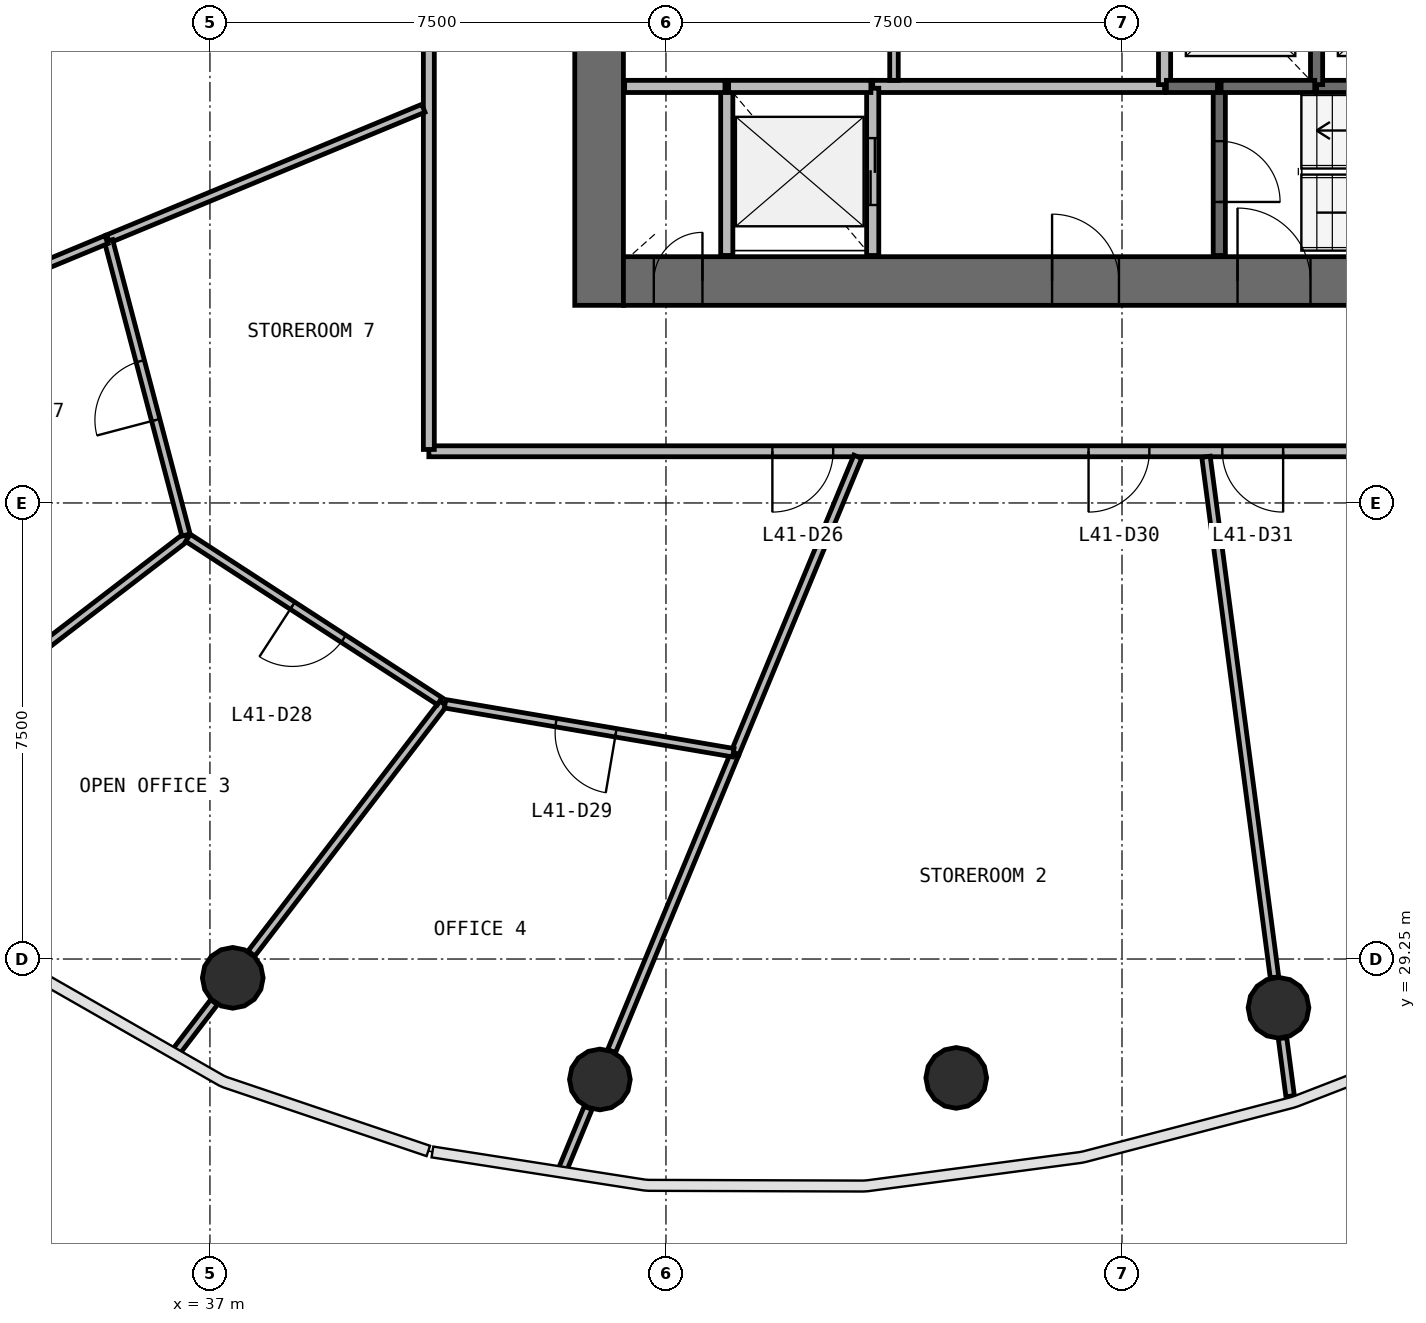
"""IFC4 building model, lengths in metres.
Left out: names, types, materials, properties, quantities, classifications, styles, units other than length and angle.
Written with IfcOpenShell. Run it as: python <this file> out.ifc"""

import sys

from ifc_helpers import new_model, si_unit, direction, frame, frame_2d, origin, origin_2d, place, context, subcontext, project, spatial, rectangle, circle, extrude, source, transform, mapped, element, fill, save


model = new_model("IFC4")
c1 = context("Model", 3, precision=1e-05, world=origin(), true_north=direction((0.0, 1.0)))
c2 = subcontext(c1, "Body", "Model", "MODEL_VIEW")
j1 = project(units=[si_unit("LENGTHUNIT", "METRE"), si_unit("PLANEANGLEUNIT", "RADIAN")], contexts=[c1])
p1 = place(None, origin())
s1 = spatial("IfcSite", under=j1, at=p1, CompositionType="ELEMENT")
p2 = place(p1, origin())
s2 = spatial("IfcBuilding", under=s1, at=p2, CompositionType="ELEMENT")
p3 = place(p2, frame((0.0, 0.0, 172.1)))
s3 = spatial("IfcBuildingStorey", under=s2, at=p3, CompositionType="ELEMENT", Elevation=172.1)
p4 = place(p3, frame((43.4, 56.0, 0.0), z_axis=(0.0, 0.0, 1.0), x_axis=(0.0, -1.0, 0.0)))
e1 = element("IfcWall", 1, at=p4, inside=s3, PredefinedType="SHEAR", context=c2, shape_type="SweptSolid", body=[
    extrude(rectangle(XDim=16.0, YDim=0.8, at=frame_2d((8.0, 0.0))), origin(), (0.0, 0.0, 1.0), 3.9),
])
p5 = place(p4, frame((7.1, 0.0, 0.0)))
e2 = element("IfcOpeningElement", 2, at=p5, cuts=e1, PredefinedType="OPENING", context=c2, shape_type="SweptSolid", body=[
    extrude(rectangle(XDim=1.8, YDim=2.1, at=frame_2d((0.9, 1.05))), frame((0.0, 0.41, 0.0), z_axis=(0.0, -1.0, 0.0), x_axis=(1.0, 0.0, 0.0)), (0.0, 0.0, 1.0), 0.82),
])
p6 = place(p3, frame((43.8, 40.4, 0.0), z_axis=(0.0, 0.0, 1.0), x_axis=(1.0, 0.0, 0.0)))
e3 = element("IfcWall", 3, at=p6, inside=s3, PredefinedType="SHEAR", context=c2, shape_type="SweptSolid", body=[
    extrude(rectangle(XDim=16.4, YDim=0.8, at=frame_2d((8.2, 0.0))), origin(), (0.0, 0.0, 1.0), 3.9),
])
p7 = place(p6, frame((10.1, 0.0, 0.0)))
e4 = element("IfcOpeningElement", 4, at=p7, cuts=e3, PredefinedType="OPENING", context=c2, shape_type="SweptSolid", body=[
    extrude(rectangle(XDim=1.2, YDim=2.1, at=frame_2d((0.6, 1.05))), frame((0.0, 0.41, 0.0), z_axis=(0.0, -1.0, 0.0), x_axis=(1.0, 0.0, 0.0)), (0.0, 0.0, 1.0), 0.82),
])
p8 = place(p6, frame((7.05, 0.0, 0.0)))
e5 = element("IfcOpeningElement", 5, at=p8, cuts=e3, PredefinedType="OPENING", context=c2, shape_type="SweptSolid", body=[
    extrude(rectangle(XDim=1.1, YDim=2.1, at=frame_2d((0.55, 1.05))), frame((0.0, 0.41, 0.0), z_axis=(0.0, -1.0, 0.0), x_axis=(1.0, 0.0, 0.0)), (0.0, 0.0, 1.0), 0.82),
])
p9 = place(p6, frame((0.5, 0.0, 0.0)))
e6 = element("IfcOpeningElement", 6, at=p9, cuts=e3, PredefinedType="OPENING", context=c2, shape_type="SweptSolid", body=[
    extrude(rectangle(XDim=0.8, YDim=2.1, at=frame_2d((0.4, 1.05))), frame((0.0, 0.41, 0.0), z_axis=(0.0, -1.0, 0.0), x_axis=(1.0, 0.0, 0.0)), (0.0, 0.0, 1.0), 0.82),
])
m1 = source(origin(), c2, "Body", "SweptSolid", [
    extrude(circle(Radius=0.5, at=origin_2d()), origin(), (0.0, 0.0, 1.0), 3.9),
])
for number, where, z_axis, x_axis in (
    (7, (37.375, 28.94, 0.0), (0.0, 0.0, 1.0), (1.0, 0.0, 0.0)),
    (8, (43.413, 27.269, 0.0), (0.0, 0.0, 1.0), (1.0, 0.0, 0.0)),
    (9, (49.274, 27.295, 0.0), (0.0, 0.0, 1.0), (1.0, 0.0, 0.0)),
    (10, (54.574, 28.449, 0.0), (0.0, 0.0, 1.0), (1.0, 0.0, 0.0)),
):
    element("IfcColumn", number, at=place(p3, frame(where, z_axis=z_axis, x_axis=x_axis)), inside=s3, PredefinedType="COLUMN", context=c2, shape_type="MappedRepresentation", body=[
        mapped(m1, transform((0.0, 0.0, 0.0), scale=1.0)),
    ])
p10 = place(p3, frame((52.7, 43.6, 0.0), z_axis=(0.0, 0.0, 1.0), x_axis=(-1.0, 0.0, 0.0)))
e11 = element("IfcWall", 11, at=p10, inside=s3, PredefinedType="SOLIDWALL", context=c2, shape_type="SweptSolid", body=[
    extrude(rectangle(XDim=4.8, YDim=0.2, at=frame_2d((2.4, 0.0))), origin(), (0.0, 0.0, 1.0), 3.58),
])
p11 = place(p3, frame((45.5, 43.6, 0.0), z_axis=(0.0, 0.0, 1.0), x_axis=(0.0, -1.0, 0.0)))
e12 = element("IfcWall", 12, at=p11, inside=s3, PredefinedType="SOLIDWALL", context=c2, shape_type="SweptSolid", body=[
    extrude(rectangle(XDim=2.78, YDim=0.2, at=frame_2d((1.39, 0.0))), origin(), (0.0, 0.0, 1.0), 3.58),
])
p12 = place(p3, frame((47.9, 40.82, 0.0), z_axis=(0.0, 0.0, 1.0), x_axis=(0.0, 1.0, 0.0)))
e13 = element("IfcWall", 13, at=p12, inside=s3, PredefinedType="SOLIDWALL", context=c2, shape_type="SweptSolid", body=[
    extrude(rectangle(XDim=2.75, YDim=0.2, at=frame_2d((1.375, 0.0))), origin(), (0.0, 0.0, 1.0), 3.58),
])
p13 = place(p12, frame((0.83, 0.0, 0.0)))
e14 = element("IfcOpeningElement", 14, at=p13, cuts=e13, PredefinedType="OPENING", context=c2, shape_type="SweptSolid", body=[
    extrude(rectangle(XDim=1.1, YDim=2.1, at=frame_2d((0.55, 1.05))), frame((0.0, 0.11, 0.0), z_axis=(0.0, -1.0, 0.0), x_axis=(1.0, 0.0, 0.0)), (0.0, 0.0, 1.0), 0.22),
])
p14 = place(p3, frame((53.6, 43.6, 0.0), z_axis=(0.0, 0.0, 1.0), x_axis=(0.0, -1.0, 0.0)))
e15 = element("IfcWall", 15, at=p14, inside=s3, PredefinedType="SOLIDWALL", context=c2, shape_type="SweptSolid", body=[
    extrude(rectangle(XDim=2.78, YDim=0.2, at=frame_2d((1.39, 0.0))), origin(), (0.0, 0.0, 1.0), 3.58),
])
p15 = place(p14, frame((0.9, 0.0, 0.0)))
e16 = element("IfcOpeningElement", 16, at=p15, cuts=e15, PredefinedType="OPENING", context=c2, shape_type="SweptSolid", body=[
    extrude(rectangle(XDim=1.0, YDim=2.1, at=frame_2d((0.5, 1.05))), frame((0.0, 0.11, 0.0), z_axis=(0.0, -1.0, 0.0), x_axis=(1.0, 0.0, 0.0)), (0.0, 0.0, 1.0), 0.22),
])
p16 = place(p3, frame((55.2, 43.6, 0.0), z_axis=(0.0, 0.0, 1.0), x_axis=(1.0, 0.0, 0.0)))
e17 = element("IfcWall", 17, at=p16, inside=s3, PredefinedType="SOLIDWALL", context=c2, shape_type="SweptSolid", body=[
    extrude(rectangle(XDim=2.5, YDim=0.2, at=frame_2d((1.25, 0.0))), origin(), (0.0, 0.0, 1.0), 3.58),
])
p17 = place(p3, frame((47.87, 43.6, 0.0), z_axis=(0.0, 0.0, 1.0), x_axis=(-1.0, 0.0, 0.0)))
e18 = element("IfcWall", 18, at=p17, inside=s3, PredefinedType="SOLIDWALL", context=c2, shape_type="SweptSolid", body=[
    extrude(rectangle(XDim=2.34, YDim=0.2, at=frame_2d((1.17, 0.0))), origin(), (0.0, 0.0, 1.0), 3.58),
])
for number, where, z_axis, x_axis in (
    (19, (52.7, 45.99, 0.0), (0.0, 0.0, 1.0), (0.0, -1.0, 0.0)),
    (20, (55.2, 43.63, 0.0), (0.0, 0.0, 1.0), (0.0, 1.0, 0.0)),
):
    element("IfcWall", number, at=place(p3, frame(where, z_axis=z_axis, x_axis=x_axis)), inside=s3, PredefinedType="SOLIDWALL", context=c2, shape_type="SweptSolid", body=[
        extrude(rectangle(XDim=2.36, YDim=0.2, at=frame_2d((1.18, 0.0))), origin(), (0.0, 0.0, 1.0), 3.58),
    ])
p18 = place(p3, frame((45.47, 43.6, 0.0), z_axis=(0.0, 0.0, 1.0), x_axis=(-1.0, 0.0, 0.0)))
e21 = element("IfcWall", 21, at=p18, inside=s3, PredefinedType="SOLIDWALL", context=c2, shape_type="SweptSolid", body=[
    extrude(rectangle(XDim=1.65, YDim=0.2, at=frame_2d((0.825, 0.0))), origin(), (0.0, 0.0, 1.0), 3.58),
])
p19 = place(p3, frame((53.63, 43.6, 0.0), z_axis=(0.0, 0.0, 1.0), x_axis=(1.0, 0.0, 0.0)))
e22 = element("IfcWall", 22, at=p19, inside=s3, PredefinedType="SOLIDWALL", context=c2, shape_type="SweptSolid", body=[
    extrude(rectangle(XDim=1.54, YDim=0.2, at=frame_2d((0.77, 0.0))), origin(), (0.0, 0.0, 1.0), 3.58),
])
p20 = place(p3, frame((52.73, 43.6, 0.0), z_axis=(0.0, 0.0, 1.0), x_axis=(1.0, 0.0, 0.0)))
e23 = element("IfcWall", 23, at=p20, inside=s3, PredefinedType="SOLIDWALL", context=c2, shape_type="SweptSolid", body=[
    extrude(rectangle(XDim=0.84, YDim=0.2, at=frame_2d((0.42, 0.0))), origin(), (0.0, 0.0, 1.0), 3.58),
])
p21 = place(p3, frame((63.4, 37.6, 0.0), z_axis=(0.0, 0.0, 1.0), x_axis=(-1.0, 0.0, 0.0)))
e24 = element("IfcWall", 24, at=p21, inside=s3, PredefinedType="PARTITIONING", context=c2, shape_type="SweptSolid", body=[
    extrude(rectangle(XDim=22.8, YDim=0.18, at=frame_2d((11.4, 0.0))), origin(), (0.0, 0.0, 1.0), 2.88),
])
p22 = place(p21, frame((16.15, 0.0, 0.0)))
e25 = element("IfcOpeningElement", 25, at=p22, cuts=e24, PredefinedType="OPENING", context=c2, shape_type="SweptSolid", body=[
    extrude(rectangle(XDim=1.0, YDim=2.1, at=frame_2d((0.5, 1.05))), frame((0.0, 0.1, 0.0), z_axis=(0.0, -1.0, 0.0), x_axis=(1.0, 0.0, 0.0)), (0.0, 0.0, 1.0), 0.2),
])
p23 = place(p21, frame((10.95, 0.0, 0.0)))
e26 = element("IfcOpeningElement", 26, at=p23, cuts=e24, PredefinedType="OPENING", context=c2, shape_type="SweptSolid", body=[
    extrude(rectangle(XDim=1.0, YDim=2.1, at=frame_2d((0.5, 1.05))), frame((0.0, 0.1, 0.0), z_axis=(0.0, -1.0, 0.0), x_axis=(1.0, 0.0, 0.0)), (0.0, 0.0, 1.0), 0.2),
])
p24 = place(p21, frame((8.75, 0.0, 0.0)))
e27 = element("IfcOpeningElement", 27, at=p24, cuts=e24, PredefinedType="OPENING", context=c2, shape_type="SweptSolid", body=[
    extrude(rectangle(XDim=1.0, YDim=2.1, at=frame_2d((0.5, 1.05))), frame((0.0, 0.1, 0.0), z_axis=(0.0, -1.0, 0.0), x_axis=(1.0, 0.0, 0.0)), (0.0, 0.0, 1.0), 0.2),
])
p25 = place(p3, frame((40.6, 37.63, 0.0), z_axis=(0.0, 0.0, 1.0), x_axis=(0.0, 1.0, 0.0)))
e28 = element("IfcWall", 28, at=p25, inside=s3, PredefinedType="PARTITIONING", context=c2, shape_type="SweptSolid", body=[
    extrude(rectangle(XDim=20.74, YDim=0.18, at=frame_2d((10.37, 0.0))), origin(), (0.0, 0.0, 1.0), 2.88),
])
p26 = place(p25, frame((15.39, 0.0, 0.0)))
e29 = element("IfcOpeningElement", 29, at=p26, cuts=e28, PredefinedType="OPENING", context=c2, shape_type="SweptSolid", body=[
    extrude(rectangle(XDim=0.9, YDim=2.1, at=frame_2d((0.45, 1.05))), frame((0.0, 0.1, 0.0), z_axis=(0.0, -1.0, 0.0), x_axis=(1.0, 0.0, 0.0)), (0.0, 0.0, 1.0), 0.2),
])
p27 = place(p25, frame((9.89, 0.0, 0.0)))
e30 = element("IfcOpeningElement", 30, at=p27, cuts=e28, PredefinedType="OPENING", context=c2, shape_type="SweptSolid", body=[
    extrude(rectangle(XDim=1.0, YDim=2.1, at=frame_2d((0.5, 1.05))), frame((0.0, 0.1, 0.0), z_axis=(0.0, -1.0, 0.0), x_axis=(1.0, 0.0, 0.0)), (0.0, 0.0, 1.0), 0.2),
])
p28 = place(p3, frame((53.381, 37.51, 0.0), z_axis=(0.0, 0.0, 1.0), x_axis=(0.130507901859, -0.991447269174, 0.0)))
e31 = element("IfcWall", 31, at=p28, inside=s3, PredefinedType="PARTITIONING", context=c2, shape_type="SweptSolid", body=[
    extrude(rectangle(XDim=8.635, YDim=0.14, at=frame_2d((4.318, 0.0))), origin(), (0.0, 0.0, 1.0), 2.88),
])
p29 = place(p3, frame((40.51, 43.241, 0.0), z_axis=(0.0, 0.0, 1.0), x_axis=(-0.923868925848, -0.382709038112, 0.0)))
e32 = element("IfcWall", 32, at=p29, inside=s3, PredefinedType="PARTITIONING", context=c2, shape_type="SweptSolid", body=[
    extrude(rectangle(XDim=5.613, YDim=0.14, at=frame_2d((2.807, 0.0))), origin(), (0.0, 0.0, 1.0), 2.88),
])
p30 = place(p3, frame((47.655, 37.51, 0.0), z_axis=(0.0, 0.0, 1.0), x_axis=(-0.382658470946, -0.923889871474, 0.0)))
e33 = element("IfcWall", 33, at=p30, inside=s3, PredefinedType="PARTITIONING", context=c2, shape_type="SweptSolid", body=[
    extrude(rectangle(XDim=5.273, YDim=0.14, at=frame_2d((2.637, 0.0))), origin(), (0.0, 0.0, 1.0), 2.88),
])
p31 = place(p3, frame((45.625, 32.61, 0.0), z_axis=(0.0, 0.0, 1.0), x_axis=(-0.382699142992, -0.9238730248, 0.0)))
e34 = element("IfcWall", 34, at=p31, inside=s3, PredefinedType="PARTITIONING", context=c2, shape_type="SweptSolid", body=[
    extrude(rectangle(XDim=5.276, YDim=0.14, at=frame_2d((2.638, 0.0))), origin(), (0.0, 0.0, 1.0), 2.88),
])
p32 = place(p3, frame((40.837, 33.453, 0.0), z_axis=(0.0, 0.0, 1.0), x_axis=(-0.608781556018, -0.793337895888, 0.0)))
e35 = element("IfcWall", 35, at=p32, inside=s3, PredefinedType="PARTITIONING", context=c2, shape_type="SweptSolid", body=[
    extrude(rectangle(XDim=5.183, YDim=0.14, at=frame_2d((2.591, 0.0))), origin(), (0.0, 0.0, 1.0), 2.88),
])
p33 = place(p3, frame((36.614, 36.194, 0.0), z_axis=(0.0, 0.0, 1.0), x_axis=(-0.793380951851, -0.608725443234, 0.0)))
e36 = element("IfcWall", 36, at=p33, inside=s3, PredefinedType="PARTITIONING", context=c2, shape_type="SweptSolid", body=[
    extrude(rectangle(XDim=5.092, YDim=0.14, at=frame_2d((2.546, 0.0))), origin(), (0.0, 0.0, 1.0), 2.88),
])
p34 = place(p3, frame((36.606, 36.223, 0.0), z_axis=(0.0, 0.0, 1.0), x_axis=(-0.254531708775, 0.967064428685, 0.0)))
e37 = element("IfcWall", 37, at=p34, inside=s3, PredefinedType="PARTITIONING", context=c2, shape_type="SweptSolid", body=[
    extrude(rectangle(XDim=5.006, YDim=0.14, at=frame_2d((2.503, 0.0))), origin(), (0.0, 0.0, 1.0), 2.88),
])
p35 = place(p34, frame((1.956, 0.0, 0.0)))
e38 = element("IfcOpeningElement", 38, at=p35, cuts=e37, PredefinedType="OPENING", context=c2, shape_type="SweptSolid", body=[
    extrude(rectangle(XDim=1.0, YDim=2.1, at=frame_2d((0.5, 1.05))), frame((0.0, 0.08, 0.0), z_axis=(0.0, -1.0, 0.0), x_axis=(1.0, 0.0, 0.0)), (0.0, 0.0, 1.0), 0.16),
])
p36 = place(p3, frame((40.779, 33.491, 0.0), z_axis=(0.0, 0.0, 1.0), x_axis=(-0.83885932545, 0.544348263619, 0.0)))
e39 = element("IfcWall", 39, at=p36, inside=s3, PredefinedType="PARTITIONING", context=c2, shape_type="SweptSolid", body=[
    extrude(rectangle(XDim=4.935, YDim=0.14, at=frame_2d((2.467, 0.0))), origin(), (0.0, 0.0, 1.0), 2.88),
])
p37 = place(p36, frame((1.885, 0.0, 0.0)))
e40 = element("IfcOpeningElement", 40, at=p37, cuts=e39, PredefinedType="OPENING", context=c2, shape_type="SweptSolid", body=[
    extrude(rectangle(XDim=1.0, YDim=2.1, at=frame_2d((0.5, 1.05))), frame((0.0, 0.08, 0.0), z_axis=(0.0, -1.0, 0.0), x_axis=(1.0, 0.0, 0.0)), (0.0, 0.0, 1.0), 0.16),
])
p38 = place(p3, frame((45.607, 32.643, 0.0), z_axis=(0.0, 0.0, 1.0), x_axis=(-0.985896840753, 0.167354173514, 0.0)))
e41 = element("IfcWall", 41, at=p38, inside=s3, PredefinedType="PARTITIONING", context=c2, shape_type="SweptSolid", body=[
    extrude(rectangle(XDim=4.808, YDim=0.14, at=frame_2d((2.404, 0.0))), origin(), (0.0, 0.0, 1.0), 2.88),
])
p39 = place(p38, frame((1.958, 0.0, 0.0)))
e42 = element("IfcOpeningElement", 42, at=p39, cuts=e41, PredefinedType="OPENING", context=c2, shape_type="SweptSolid", body=[
    extrude(rectangle(XDim=1.0, YDim=2.1, at=frame_2d((0.5, 1.05))), frame((0.0, 0.08, 0.0), z_axis=(0.0, -1.0, 0.0), x_axis=(1.0, 0.0, 0.0)), (0.0, 0.0, 1.0), 0.16),
])
p40 = place(p3, frame((48.25, 43.7, 0.0), z_axis=(0.0, 0.0, 1.0), x_axis=(0.0, 1.0, 0.0)))
e43 = element("IfcWall", 43, at=p40, inside=s3, PredefinedType="PARTITIONING", context=c2, shape_type="SweptSolid", body=[
    extrude(rectangle(XDim=2.29, YDim=0.14, at=frame_2d((1.145, 0.0))), origin(), (0.0, 0.0, 1.0), 2.88),
])
p41 = place(p3, frame((35.296, 41.081, 0.0), z_axis=(0.0, 0.0, 1.0), x_axis=(-0.923914904854, -0.38259802481, 0.0)))
e44 = element("IfcWall", 44, at=p41, inside=s3, PredefinedType="PARTITIONING", context=c2, shape_type="SweptSolid", body=[
    extrude(rectangle(XDim=1.255, YDim=0.14, at=frame_2d((0.627, 0.0))), origin(), (0.0, 0.0, 1.0), 2.88),
])
p42 = place(p3, frame((43.22, 26.802, 0.0), z_axis=(0.0, 0.0, 1.0), x_axis=(-0.382724096228, -0.923862687939, 0.0)))
e45 = element("IfcWall", 45, at=p42, inside=s3, PredefinedType="PARTITIONING", context=c2, shape_type="SweptSolid", body=[
    extrude(rectangle(XDim=1.1, YDim=0.14, at=frame_2d((0.55, 0.0))), origin(), (0.0, 0.0, 1.0), 2.88),
])
p43 = place(p3, frame((37.068, 28.54, 0.0), z_axis=(0.0, 0.0, 1.0), x_axis=(-0.608710939512, -0.793392079692, 0.0)))
e46 = element("IfcWall", 46, at=p43, inside=s3, PredefinedType="PARTITIONING", context=c2, shape_type="SweptSolid", body=[
    extrude(rectangle(XDim=1.027, YDim=0.14, at=frame_2d((0.514, 0.0))), origin(), (0.0, 0.0, 1.0), 2.88),
])
p44 = place(p3, frame((54.64, 27.948, 0.0), z_axis=(0.0, 0.0, 1.0), x_axis=(0.130303682633, -0.991474129916, 0.0)))
e47 = element("IfcWall", 47, at=p44, inside=s3, PredefinedType="PARTITIONING", context=c2, shape_type="SweptSolid", body=[
    extrude(rectangle(XDim=0.963, YDim=0.14, at=frame_2d((0.481, 0.0))), origin(), (0.0, 0.0, 1.0), 2.88),
])
m2 = source(origin(), c2, "Body", "SweptSolid", [
    extrude(rectangle(XDim=1.1, YDim=2.1, at=frame_2d((0.55, 1.05))), frame((0.0, 0.025, 0.0), z_axis=(0.0, -1.0, 0.0), x_axis=(1.0, 0.0, 0.0)), (0.0, 0.0, 1.0), 0.05),
])
p45 = place(p13, origin())
e48 = element("IfcDoor", 48, at=p45, inside=s3, OperationType="DOUBLE_DOOR_SLIDING", PredefinedType="USERDEFINED", context=c2, shape_type="MappedRepresentation", body=[
    mapped(m2, transform((0.0, 0.0, 0.0), scale=1.0)),
])
fill(e14, e48)
m3 = source(origin(), c2, "Body", "SweptSolid", [
    extrude(rectangle(XDim=1.2, YDim=2.1, at=frame_2d((0.6, 1.05))), frame((0.0, 0.025, 0.0), z_axis=(0.0, -1.0, 0.0), x_axis=(1.0, 0.0, 0.0)), (0.0, 0.0, 1.0), 0.05),
])
p46 = place(p7, origin())
e49 = element("IfcDoor", 49, at=p46, inside=s3, OperationType="SINGLE_SWING_LEFT", PredefinedType="DOOR", context=c2, shape_type="MappedRepresentation", body=[
    mapped(m3, transform((0.0, 0.0, 0.0), scale=1.0)),
])
fill(e4, e49)
m4 = source(origin(), c2, "Body", "SweptSolid", [
    extrude(rectangle(XDim=1.0, YDim=2.1, at=frame_2d((0.5, 1.05))), frame((0.0, 0.025, 0.0), z_axis=(0.0, -1.0, 0.0), x_axis=(1.0, 0.0, 0.0)), (0.0, 0.0, 1.0), 0.05),
])
p47 = place(p15, origin())
e50 = element("IfcDoor", 50, at=p47, inside=s3, OperationType="SINGLE_SWING_RIGHT", PredefinedType="DOOR", context=c2, shape_type="MappedRepresentation", body=[
    mapped(m4, transform((0.0, 0.0, 0.0), scale=1.0)),
])
fill(e16, e50)
m5 = source(origin(), c2, "Body", "SweptSolid", [
    extrude(rectangle(XDim=1.1, YDim=2.1, at=frame_2d((0.55, 1.05))), frame((0.0, 0.025, 0.0), z_axis=(0.0, -1.0, 0.0), x_axis=(1.0, 0.0, 0.0)), (0.0, 0.0, 1.0), 0.05),
])
p48 = place(p8, origin())
e51 = element("IfcDoor", 51, at=p48, inside=s3, OperationType="SINGLE_SWING_LEFT", PredefinedType="DOOR", context=c2, shape_type="MappedRepresentation", body=[
    mapped(m5, transform((0.0, 0.0, 0.0), scale=1.0)),
])
fill(e5, e51)
m6 = source(origin(), c2, "Body", "SweptSolid", [
    extrude(rectangle(XDim=0.8, YDim=2.1, at=frame_2d((0.4, 1.05))), frame((0.0, 0.025, 0.0), z_axis=(0.0, -1.0, 0.0), x_axis=(1.0, 0.0, 0.0)), (0.0, 0.0, 1.0), 0.05),
])
p49 = place(p9, origin())
e52 = element("IfcDoor", 52, at=p49, inside=s3, OperationType="SINGLE_SWING_RIGHT", PredefinedType="DOOR", context=c2, shape_type="MappedRepresentation", body=[
    mapped(m6, transform((0.0, 0.0, 0.0), scale=1.0)),
])
fill(e6, e52)
m7 = source(origin(), c2, "Body", "SweptSolid", [
    extrude(rectangle(XDim=1.0, YDim=2.1, at=frame_2d((0.5, 1.05))), frame((0.0, 0.025, 0.0), z_axis=(0.0, -1.0, 0.0), x_axis=(1.0, 0.0, 0.0)), (0.0, 0.0, 1.0), 0.05),
])
p50 = place(p22, origin())
e53 = element("IfcDoor", 53, at=p50, inside=s3, OperationType="SINGLE_SWING_RIGHT", PredefinedType="DOOR", context=c2, shape_type="MappedRepresentation", body=[
    mapped(m7, transform((0.0, 0.0, 0.0), scale=1.0)),
])
fill(e25, e53)
p51 = place(p35, origin())
e54 = element("IfcDoor", 54, at=p51, inside=s3, OperationType="SINGLE_SWING_LEFT", PredefinedType="DOOR", context=c2, shape_type="MappedRepresentation", body=[
    mapped(m7, transform((0.0, 0.0, 0.0), scale=1.0)),
])
fill(e38, e54)
p52 = place(p37, origin())
e55 = element("IfcDoor", 55, at=p52, inside=s3, OperationType="SINGLE_SWING_RIGHT", PredefinedType="DOOR", context=c2, shape_type="MappedRepresentation", body=[
    mapped(m7, transform((0.0, 0.0, 0.0), scale=1.0)),
])
fill(e40, e55)
p53 = place(p39, origin())
e56 = element("IfcDoor", 56, at=p53, inside=s3, OperationType="SINGLE_SWING_LEFT", PredefinedType="DOOR", context=c2, shape_type="MappedRepresentation", body=[
    mapped(m7, transform((0.0, 0.0, 0.0), scale=1.0)),
])
fill(e42, e56)
p54 = place(p23, origin())
e57 = element("IfcDoor", 57, at=p54, inside=s3, OperationType="SINGLE_SWING_RIGHT", PredefinedType="DOOR", context=c2, shape_type="MappedRepresentation", body=[
    mapped(m7, transform((0.0, 0.0, 0.0), scale=1.0)),
])
fill(e26, e57)
p55 = place(p24, origin())
e58 = element("IfcDoor", 58, at=p55, inside=s3, OperationType="SINGLE_SWING_LEFT", PredefinedType="DOOR", context=c2, shape_type="MappedRepresentation", body=[
    mapped(m7, transform((0.0, 0.0, 0.0), scale=1.0)),
])
fill(e27, e58)
save(model, sys.argv[1])
